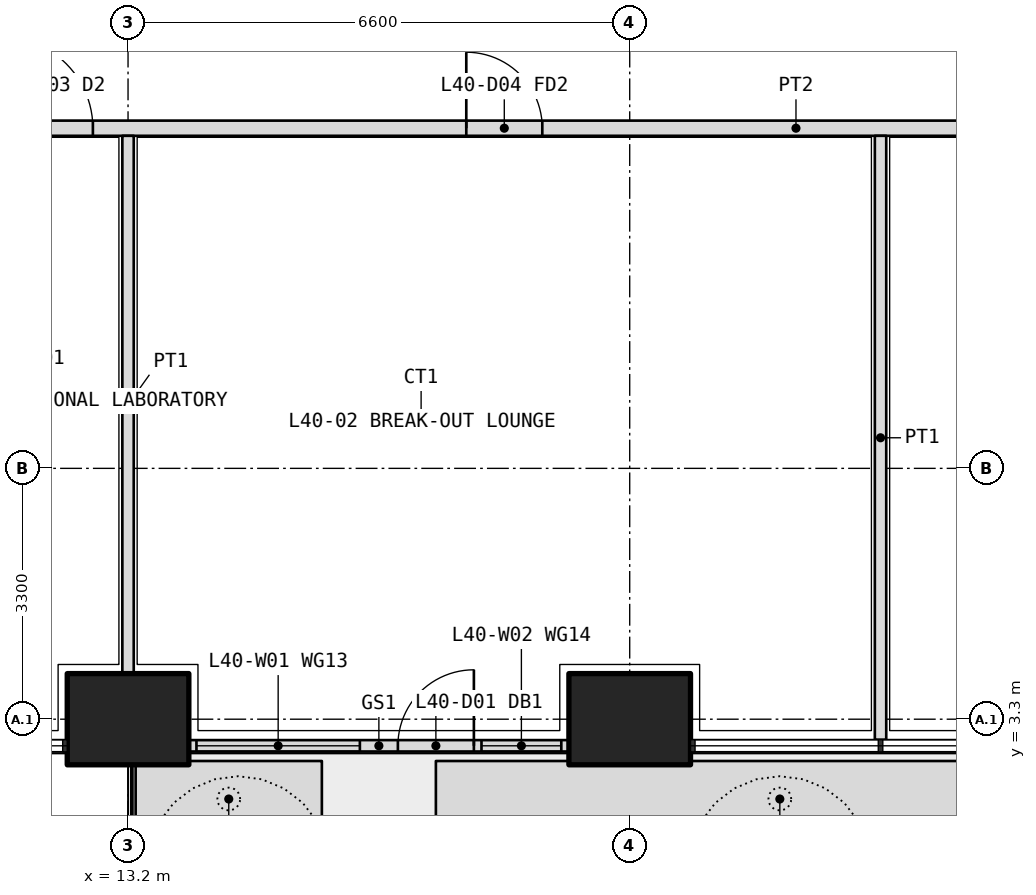
"""IFC4 building model, lengths in metres.
Left out: names, types, materials, properties, quantities, classifications, styles, units other than length and angle.
Written with IfcOpenShell. Run it as: python <this file> out.ifc"""

import sys

from ifc_helpers import new_model, si_unit, direction, frame, frame_2d, origin, origin_2d, place, context, subcontext, project, spatial, polyline, rectangle, outline, extrude, element, fill, save


model = new_model("IFC4")
c1 = context("Model", 3, precision=1e-05, world=origin(), true_north=direction((0.0, 1.0)))
c2 = subcontext(c1, "Body", "Model", "MODEL_VIEW")
j1 = project(units=[si_unit("LENGTHUNIT", "METRE"), si_unit("PLANEANGLEUNIT", "RADIAN")], contexts=[c1])
p1 = place(None, origin())
s1 = spatial("IfcSite", under=j1, at=p1, CompositionType="ELEMENT")
p2 = place(p1, origin())
s2 = spatial("IfcBuilding", under=s1, at=p2, CompositionType="ELEMENT")
p3 = place(p2, frame((0.0, 0.0, 176.7)))
s3 = spatial("IfcBuildingStorey", under=s2, at=p3, CompositionType="ELEMENT", Elevation=176.7)
for number, where, z_axis, x_axis in (
    (1, (13.2, 3.3, 0.0), (0.0, 0.0, 1.0), (1.0, 0.0, 0.0)),
    (2, (19.8, 3.3, 0.0), (0.0, 0.0, 1.0), (1.0, 0.0, 0.0)),
):
    element("IfcColumn", number, at=place(p3, frame(where, z_axis=z_axis, x_axis=x_axis)), inside=s3, PredefinedType="COLUMN", context=c2, shape_type="SweptSolid", body=[
        extrude(rectangle(XDim=1.6, YDim=1.2, at=origin_2d()), origin(), (0.0, 0.0, 1.0), 4.2),
    ])
p4 = place(p3, origin())
e3 = element("IfcWall", 3, at=p4, inside=s3, PredefinedType="USERDEFINED", context=c2, shape_type="SweptSolid", body=[
    extrude(outline(polyline([(13.3, 1.75), (15.75, 1.75), (15.75, 2.75), (13.3, 2.75), (13.3, 1.75)]), holes=[polyline([(13.45, 1.9), (15.6, 1.9), (15.6, 2.6), (13.45, 2.6), (13.45, 1.9)])]), origin(), (0.0, 0.0, 1.0), 1.05),
])
p5 = place(p3, origin())
e4 = element("IfcWall", 4, at=p5, inside=s3, PredefinedType="USERDEFINED", context=c2, shape_type="SweptSolid", body=[
    extrude(outline(polyline([(17.25, 1.75), (26.3, 1.75), (26.3, 2.75), (17.25, 2.75), (17.25, 1.75)]), holes=[polyline([(17.4, 1.9), (26.15, 1.9), (26.15, 2.6), (17.4, 2.6), (17.4, 1.9)])]), origin(), (0.0, 0.0, 1.0), 1.05),
])
p6 = place(p3, frame((14.0, 2.95, 0.0), z_axis=(0.0, 0.0, 1.0), x_axis=(1.0, 0.0, 0.0)))
e5 = element("IfcWall", 5, at=p6, inside=s3, PredefinedType="SOLIDWALL", context=c2, shape_type="SweptSolid", body=[
    extrude(rectangle(XDim=5.0, YDim=0.15, at=frame_2d((2.5, 0.0))), origin(), (0.0, 0.0, 1.0), 2.7),
])
p7 = place(p6, frame((2.75, 0.0, 0.0)))
e6 = element("IfcOpeningElement", 6, at=p7, cuts=e5, PredefinedType="OPENING", context=c2, shape_type="SweptSolid", body=[
    extrude(rectangle(XDim=1.0, YDim=2.4, at=frame_2d((0.5, 1.2))), frame((0.0, 0.085, 0.0), z_axis=(0.0, -1.0, 0.0), x_axis=(1.0, 0.0, 0.0)), (0.0, 0.0, 1.0), 0.17),
])
p8 = place(p6, frame((0.1, 0.0, 0.1)))
e7 = element("IfcOpeningElement", 7, at=p8, cuts=e5, PredefinedType="OPENING", context=c2, shape_type="SweptSolid", body=[
    extrude(rectangle(XDim=2.15, YDim=2.3, at=frame_2d((1.075, 1.15))), frame((0.0, 0.085, 0.0), z_axis=(0.0, -1.0, 0.0), x_axis=(1.0, 0.0, 0.0)), (0.0, 0.0, 1.0), 0.17),
])
p9 = place(p6, frame((3.85, 0.0, 0.1)))
e8 = element("IfcOpeningElement", 8, at=p9, cuts=e5, PredefinedType="OPENING", context=c2, shape_type="SweptSolid", body=[
    extrude(rectangle(XDim=1.05, YDim=2.3, at=frame_2d((0.525, 1.15))), frame((0.0, 0.085, 0.0), z_axis=(0.0, -1.0, 0.0), x_axis=(1.0, 0.0, 0.0)), (0.0, 0.0, 1.0), 0.17),
])
p10 = place(p3, frame((10.975, 11.075, 0.0), z_axis=(0.0, 0.0, 1.0), x_axis=(1.0, 0.0, 0.0)))
e9 = element("IfcWall", 9, at=p10, inside=s3, PredefinedType="PARTITIONING", context=c2, shape_type="SweptSolid", body=[
    extrude(rectangle(XDim=22.025, YDim=0.2, at=frame_2d((11.012, 0.0))), origin(), (0.0, 0.0, 1.0), 2.85),
])
p11 = place(p10, frame((0.562, 0.0, 0.0)))
e10 = element("IfcOpeningElement", 10, at=p11, cuts=e9, PredefinedType="OPENING", context=c2, shape_type="SweptSolid", body=[
    extrude(rectangle(XDim=1.2, YDim=2.1, at=frame_2d((0.6, 1.05))), frame((0.0, 0.11, 0.0), z_axis=(0.0, -1.0, 0.0), x_axis=(1.0, 0.0, 0.0)), (0.0, 0.0, 1.0), 0.22),
])
p12 = place(p10, frame((6.675, 0.0, 0.0)))
e11 = element("IfcOpeningElement", 11, at=p12, cuts=e9, PredefinedType="OPENING", context=c2, shape_type="SweptSolid", body=[
    extrude(rectangle(XDim=1.0, YDim=2.1, at=frame_2d((0.5, 1.05))), frame((0.0, 0.11, 0.0), z_axis=(0.0, -1.0, 0.0), x_axis=(1.0, 0.0, 0.0)), (0.0, 0.0, 1.0), 0.22),
])
p13 = place(p10, frame((16.575, 0.0, 0.0)))
e12 = element("IfcOpeningElement", 12, at=p13, cuts=e9, PredefinedType="OPENING", context=c2, shape_type="SweptSolid", body=[
    extrude(rectangle(XDim=1.0, YDim=2.1, at=frame_2d((0.5, 1.05))), frame((0.0, 0.11, 0.0), z_axis=(0.0, -1.0, 0.0), x_axis=(1.0, 0.0, 0.0)), (0.0, 0.0, 1.0), 0.22),
])
p14 = place(p3, frame((13.2, 3.9, 0.0), z_axis=(0.0, 0.0, 1.0), x_axis=(0.0, 1.0, 0.0)))
e13 = element("IfcWall", 13, at=p14, inside=s3, PredefinedType="PARTITIONING", context=c2, shape_type="SweptSolid", body=[
    extrude(rectangle(XDim=7.075, YDim=0.15, at=frame_2d((3.538, 0.0))), origin(), (0.0, 0.0, 1.0), 2.85),
])
p15 = place(p3, frame((23.1, 3.03, 0.0), z_axis=(0.0, 0.0, 1.0), x_axis=(0.0, 1.0, 0.0)))
e14 = element("IfcWall", 14, at=p15, inside=s3, PredefinedType="PARTITIONING", context=c2, shape_type="SweptSolid", body=[
    extrude(rectangle(XDim=7.945, YDim=0.15, at=frame_2d((3.973, 0.0))), origin(), (0.0, 0.0, 1.0), 2.7),
])
p16 = place(p7, origin())
e15 = element("IfcDoor", 15, at=p16, inside=s3, OperationType="SINGLE_SWING_RIGHT", PredefinedType="DOOR", context=c2, shape_type="SweptSolid", body=[
    extrude(rectangle(XDim=1.0, YDim=2.4, at=frame_2d((0.5, 1.2))), frame((0.0, 0.025, 0.0), z_axis=(0.0, -1.0, 0.0), x_axis=(1.0, 0.0, 0.0)), (0.0, 0.0, 1.0), 0.05),
])
fill(e6, e15)
p17 = place(p8, origin())
e16 = element("IfcWindow", 16, at=p17, inside=s3, PartitioningType="SINGLE_PANEL", PredefinedType="WINDOW", context=c2, shape_type="SweptSolid", body=[
    extrude(rectangle(XDim=2.15, YDim=2.3, at=frame_2d((1.075, 1.15))), frame((0.0, 0.03, 0.0), z_axis=(0.0, -1.0, 0.0), x_axis=(1.0, 0.0, 0.0)), (0.0, 0.0, 1.0), 0.06),
])
fill(e7, e16)
p18 = place(p9, origin())
e17 = element("IfcWindow", 17, at=p18, inside=s3, PartitioningType="SINGLE_PANEL", PredefinedType="WINDOW", context=c2, shape_type="SweptSolid", body=[
    extrude(rectangle(XDim=1.05, YDim=2.3, at=frame_2d((0.525, 1.15))), frame((0.0, 0.03, 0.0), z_axis=(0.0, -1.0, 0.0), x_axis=(1.0, 0.0, 0.0)), (0.0, 0.0, 1.0), 0.06),
])
fill(e8, e17)
p19 = place(p11, origin())
e18 = element("IfcDoor", 18, at=p19, inside=s3, OperationType="DOUBLE_DOOR_SINGLE_SWING", PredefinedType="DOOR", context=c2, shape_type="SweptSolid", body=[
    extrude(rectangle(XDim=1.2, YDim=2.1, at=frame_2d((0.6, 1.05))), frame((0.0, 0.025, 0.0), z_axis=(0.0, -1.0, 0.0), x_axis=(1.0, 0.0, 0.0)), (0.0, 0.0, 1.0), 0.05),
])
fill(e10, e18)
p20 = place(p12, origin())
e19 = element("IfcDoor", 19, at=p20, inside=s3, OperationType="SINGLE_SWING_LEFT", PredefinedType="DOOR", context=c2, shape_type="SweptSolid", body=[
    extrude(rectangle(XDim=1.0, YDim=2.1, at=frame_2d((0.5, 1.05))), frame((0.0, 0.025, 0.0), z_axis=(0.0, -1.0, 0.0), x_axis=(1.0, 0.0, 0.0)), (0.0, 0.0, 1.0), 0.05),
])
fill(e11, e19)
save(model, sys.argv[1])
